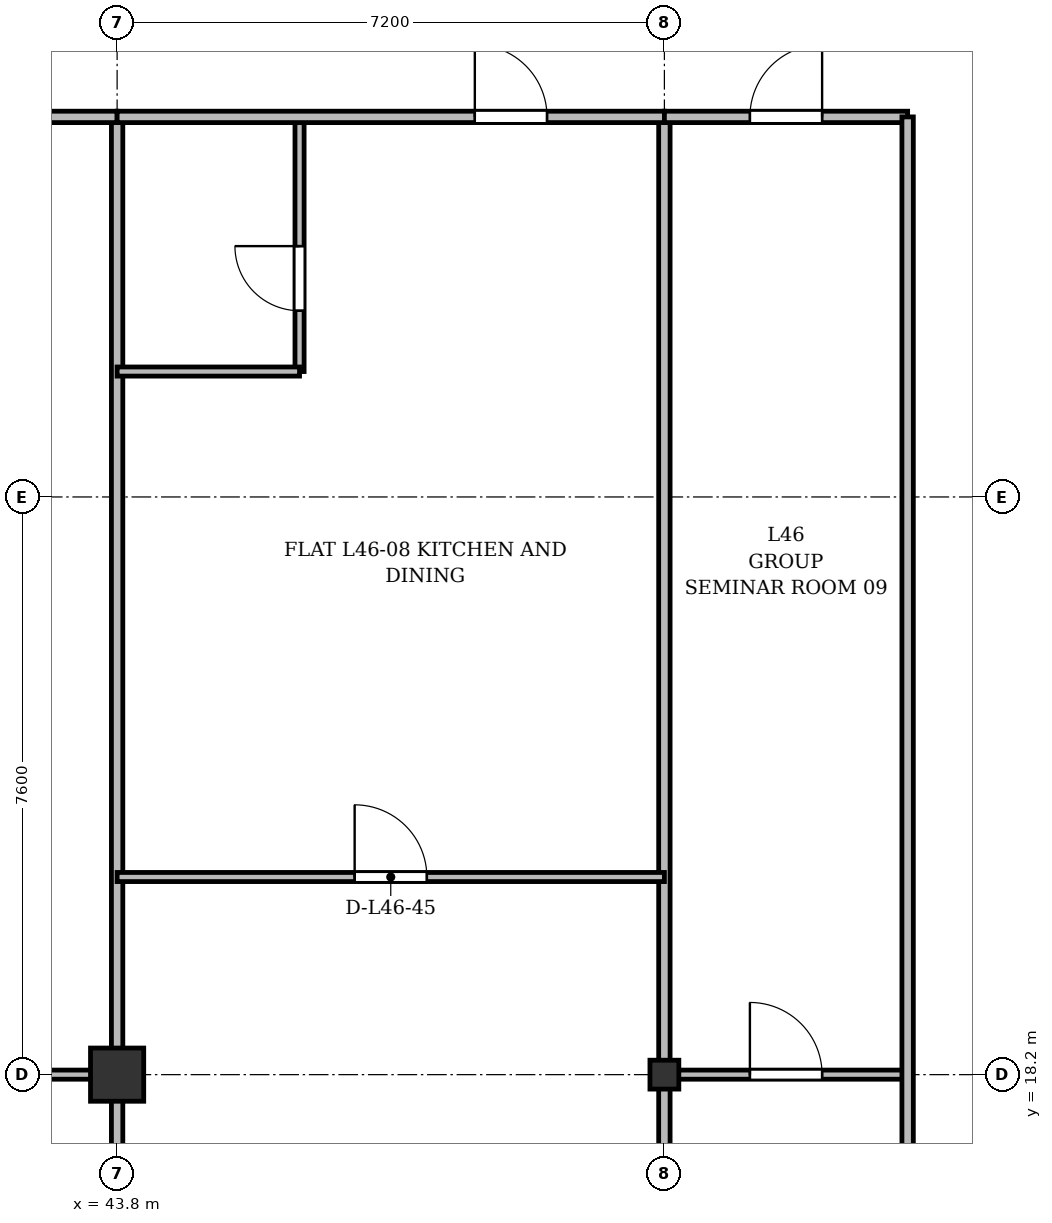
"""IFC4 building model, lengths in metres.
Left out: names, types, materials, properties, quantities, classifications, styles, units other than length and angle.
Written with IfcOpenShell. Run it as: python <this file> out.ifc"""

import sys

from ifc_helpers import new_model, si_unit, direction, frame, frame_2d, origin, origin_2d, place, context, subcontext, project, spatial, rectangle, i_section, extrude, source, transform, mapped, element, fill, save


model = new_model("IFC4")
c1 = context("Model", 3, precision=1e-05, world=origin(), true_north=direction((0.0, 1.0)))
c2 = subcontext(c1, "Body", "Model", "MODEL_VIEW")
j1 = project(units=[si_unit("LENGTHUNIT", "METRE"), si_unit("PLANEANGLEUNIT", "RADIAN")], contexts=[c1])
p1 = place(None, origin())
s1 = spatial("IfcSite", under=j1, at=p1, CompositionType="ELEMENT")
p2 = place(p1, origin())
s2 = spatial("IfcBuilding", under=s1, at=p2, CompositionType="ELEMENT")
p3 = place(p2, frame((0.0, 0.0, 175.3)))
s3 = spatial("IfcBuildingStorey", under=s2, at=p3, CompositionType="ELEMENT", Elevation=175.3)
m1 = source(origin(), c2, "Body", "SweptSolid", [
    extrude(rectangle(XDim=0.7, YDim=0.7, at=origin_2d()), origin(), (0.0, 0.0, 1.0), 3.6),
])
p4 = place(p3, frame((43.8, 18.2, 0.0), z_axis=(0.0, 0.0, 1.0), x_axis=(1.0, 0.0, 0.0)))
e1 = element("IfcColumn", 1, at=p4, inside=s3, PredefinedType="COLUMN", context=c2, shape_type="MappedRepresentation", body=[
    mapped(m1, transform((0.0, 0.0, 0.0), x_axis=(1.0, 0.0, 0.0), y_axis=(0.0, 1.0, 0.0), z_axis=(0.0, 0.0, 1.0), scale=1.0)),
])
m2 = source(origin(), c2, "Body", "SweptSolid", [
    extrude(i_section(OverallWidth=0.38, OverallDepth=0.38, WebThickness=0.02, FlangeThickness=0.03, at=origin_2d()), origin(), (0.0, 0.0, 1.0), 3.6),
])
p5 = place(p3, frame((51.0, 18.2, 0.0), z_axis=(0.0, 0.0, 1.0), x_axis=(1.0, 0.0, 0.0)))
e2 = element("IfcColumn", 2, at=p5, inside=s3, PredefinedType="COLUMN", context=c2, shape_type="MappedRepresentation", body=[
    mapped(m2, transform((0.0, 0.0, 0.0), x_axis=(1.0, 0.0, 0.0), y_axis=(0.0, 1.0, 0.0), z_axis=(0.0, 0.0, 1.0), scale=1.0)),
])
for number, where, z_axis, x_axis in (
    (3, (43.8, 3.525, 0.0), (0.0, 0.0, 1.0), (0.0, 1.0, 0.0)),
    (4, (51.0, 3.525, 0.0), (0.0, 0.0, 1.0), (0.0, 1.0, 0.0)),
):
    element("IfcWall", number, at=place(p3, frame(where, z_axis=z_axis, x_axis=x_axis)), inside=s3, PredefinedType="PARTITIONING", context=c2, shape_type="SweptSolid", body=[
        extrude(rectangle(XDim=27.275, YDim=0.15, at=frame_2d((13.638, 0.0))), origin(), (0.0, 0.0, 1.0), 2.85),
    ])
p6 = place(p3, frame((38.2, 30.8, 0.0), z_axis=(0.0, 0.0, 1.0), x_axis=(1.0, 0.0, 0.0)))
e5 = element("IfcWall", 5, at=p6, inside=s3, PredefinedType="PARTITIONING", context=c2, shape_type="SweptSolid", body=[
    extrude(rectangle(XDim=5.6, YDim=0.15, at=frame_2d((2.8, 0.0))), origin(), (0.0, 0.0, 1.0), 2.85),
])
p7 = place(p6, frame((2.232, 0.0, 0.0)))
e6 = element("IfcOpeningElement", 6, at=p7, cuts=e5, PredefinedType="OPENING", context=c2, shape_type="SweptSolid", body=[
    extrude(rectangle(XDim=0.95, YDim=2.15, at=frame_2d((0.475, 1.075))), frame((0.0, 0.085, 0.0), z_axis=(0.0, -1.0, 0.0), x_axis=(1.0, 0.0, 0.0)), (0.0, 0.0, 1.0), 0.17),
])
p8 = place(p3, frame((38.2, 18.2, 0.0), z_axis=(0.0, 0.0, 1.0), x_axis=(1.0, 0.0, 0.0)))
e7 = element("IfcWall", 7, at=p8, inside=s3, PredefinedType="PARTITIONING", context=c2, shape_type="SweptSolid", body=[
    extrude(rectangle(XDim=5.6, YDim=0.12, at=frame_2d((2.8, 0.0))), origin(), (0.0, 0.0, 1.0), 2.75),
])
p9 = place(p8, frame((2.232, 0.0, 0.0)))
e8 = element("IfcOpeningElement", 8, at=p9, cuts=e7, PredefinedType="OPENING", context=c2, shape_type="SweptSolid", body=[
    extrude(rectangle(XDim=0.95, YDim=2.15, at=frame_2d((0.475, 1.075))), frame((0.0, 0.07, 0.0), z_axis=(0.0, -1.0, 0.0), x_axis=(1.0, 0.0, 0.0)), (0.0, 0.0, 1.0), 0.14),
])
p10 = place(p3, frame((43.8, 20.8, 0.0), z_axis=(0.0, 0.0, 1.0), x_axis=(1.0, 0.0, 0.0)))
e9 = element("IfcWall", 9, at=p10, inside=s3, PredefinedType="PARTITIONING", context=c2, shape_type="SweptSolid", body=[
    extrude(rectangle(XDim=7.2, YDim=0.12, at=frame_2d((3.6, 0.0))), origin(), (0.0, 0.0, 1.0), 2.85),
])
p11 = place(p10, frame((3.125, 0.0, 0.0)))
e10 = element("IfcOpeningElement", 10, at=p11, cuts=e9, PredefinedType="OPENING", context=c2, shape_type="SweptSolid", body=[
    extrude(rectangle(XDim=0.95, YDim=2.15, at=frame_2d((0.475, 1.075))), frame((0.0, 0.07, 0.0), z_axis=(0.0, -1.0, 0.0), x_axis=(1.0, 0.0, 0.0)), (0.0, 0.0, 1.0), 0.14),
])
p12 = place(p3, frame((46.2, 27.45, 0.0), z_axis=(0.0, 0.0, 1.0), x_axis=(0.0, 1.0, 0.0)))
e11 = element("IfcWall", 11, at=p12, inside=s3, PredefinedType="PARTITIONING", context=c2, shape_type="SweptSolid", body=[
    extrude(rectangle(XDim=3.35, YDim=0.12, at=frame_2d((1.675, 0.0))), origin(), (0.0, 0.0, 1.0), 3.35),
])
p13 = place(p12, frame((0.8, 0.0, 0.0)))
e12 = element("IfcOpeningElement", 12, at=p13, cuts=e11, PredefinedType="OPENING", context=c2, shape_type="SweptSolid", body=[
    extrude(rectangle(XDim=0.85, YDim=2.1, at=frame_2d((0.425, 1.05))), frame((0.0, 0.07, 0.0), z_axis=(0.0, -1.0, 0.0), x_axis=(1.0, 0.0, 0.0)), (0.0, 0.0, 1.0), 0.14),
])
p14 = place(p3, frame((43.8, 27.45, 0.0), z_axis=(0.0, 0.0, 1.0), x_axis=(1.0, 0.0, 0.0)))
e13 = element("IfcWall", 13, at=p14, inside=s3, PredefinedType="PARTITIONING", context=c2, shape_type="SweptSolid", body=[
    extrude(rectangle(XDim=2.4, YDim=0.12, at=frame_2d((1.2, 0.0))), origin(), (0.0, 0.0, 1.0), 2.85),
])
p15 = place(p3, frame((43.8, 30.8, 0.0), z_axis=(0.0, 0.0, 1.0), x_axis=(1.0, 0.0, 0.0)))
e14 = element("IfcWall", 14, at=p15, inside=s3, PredefinedType="PARTITIONING", context=c2, shape_type="SweptSolid", body=[
    extrude(rectangle(XDim=7.2, YDim=0.15, at=frame_2d((3.6, 0.0))), origin(), (0.0, 0.0, 1.0), 2.85),
])
p16 = place(p15, frame((4.706, 0.0, 0.0)))
e15 = element("IfcOpeningElement", 15, at=p16, cuts=e14, PredefinedType="OPENING", context=c2, shape_type="SweptSolid", body=[
    extrude(rectangle(XDim=0.95, YDim=2.15, at=frame_2d((0.475, 1.075))), frame((0.0, 0.085, 0.0), z_axis=(0.0, -1.0, 0.0), x_axis=(1.0, 0.0, 0.0)), (0.0, 0.0, 1.0), 0.17),
])
p17 = place(p3, frame((51.0, 30.8, 0.0), z_axis=(0.0, 0.0, 1.0), x_axis=(1.0, 0.0, 0.0)))
e16 = element("IfcWall", 16, at=p17, inside=s3, PredefinedType="PARTITIONING", context=c2, shape_type="SweptSolid", body=[
    extrude(rectangle(XDim=3.2, YDim=0.15, at=frame_2d((1.6, 0.0))), origin(), (0.0, 0.0, 1.0), 2.85),
])
p18 = place(p17, frame((1.125, 0.0, 0.0)))
e17 = element("IfcOpeningElement", 17, at=p18, cuts=e16, PredefinedType="OPENING", context=c2, shape_type="SweptSolid", body=[
    extrude(rectangle(XDim=0.95, YDim=2.15, at=frame_2d((0.475, 1.075))), frame((0.0, 0.085, 0.0), z_axis=(0.0, -1.0, 0.0), x_axis=(1.0, 0.0, 0.0)), (0.0, 0.0, 1.0), 0.17),
])
p19 = place(p3, frame((51.0, 18.2, 0.0), z_axis=(0.0, 0.0, 1.0), x_axis=(1.0, 0.0, 0.0)))
e18 = element("IfcWall", 18, at=p19, inside=s3, PredefinedType="PARTITIONING", context=c2, shape_type="SweptSolid", body=[
    extrude(rectangle(XDim=3.2, YDim=0.12, at=frame_2d((1.6, 0.0))), origin(), (0.0, 0.0, 1.0), 2.75),
])
p20 = place(p19, frame((1.125, 0.0, 0.0)))
e19 = element("IfcOpeningElement", 19, at=p20, cuts=e18, PredefinedType="OPENING", context=c2, shape_type="SweptSolid", body=[
    extrude(rectangle(XDim=0.95, YDim=2.15, at=frame_2d((0.475, 1.075))), frame((0.0, 0.07, 0.0), z_axis=(0.0, -1.0, 0.0), x_axis=(1.0, 0.0, 0.0)), (0.0, 0.0, 1.0), 0.14),
])
p21 = place(p3, frame((54.2, 3.525, 0.0), z_axis=(0.0, 0.0, 1.0), x_axis=(0.0, 1.0, 0.0)))
e20 = element("IfcWall", 20, at=p21, inside=s3, PredefinedType="PARTITIONING", context=c2, shape_type="SweptSolid", body=[
    extrude(rectangle(XDim=27.275, YDim=0.15, at=frame_2d((13.638, 0.0))), origin(), (0.0, 0.0, 1.0), 2.75),
])
m3 = source(origin(), c2, "Body", "SweptSolid", [
    extrude(rectangle(XDim=0.95, YDim=2.15, at=frame_2d((0.475, 1.075))), frame((0.0, 0.025, 0.0), z_axis=(0.0, -1.0, 0.0), x_axis=(1.0, 0.0, 0.0)), (0.0, 0.0, 1.0), 0.05),
])
p22 = place(p11, origin())
e21 = element("IfcDoor", 21, at=p22, inside=s3, OperationType="SINGLE_SWING_LEFT", PredefinedType="DOOR", context=c2, shape_type="MappedRepresentation", body=[
    mapped(m3, transform((0.0, 0.0, 0.0), x_axis=(1.0, 0.0, 0.0), y_axis=(0.0, 1.0, 0.0), z_axis=(0.0, 0.0, 1.0), scale=1.0)),
])
fill(e10, e21)
m4 = source(origin(), c2, "Body", "SweptSolid", [
    extrude(rectangle(XDim=0.85, YDim=2.1, at=frame_2d((0.425, 1.05))), frame((0.0, 0.025, 0.0), z_axis=(0.0, -1.0, 0.0), x_axis=(1.0, 0.0, 0.0)), (0.0, 0.0, 1.0), 0.05),
])
p23 = place(p13, origin())
e22 = element("IfcDoor", 22, at=p23, inside=s3, OperationType="SINGLE_SWING_RIGHT", PredefinedType="DOOR", context=c2, shape_type="MappedRepresentation", body=[
    mapped(m4, transform((0.0, 0.0, 0.0), x_axis=(1.0, 0.0, 0.0), y_axis=(0.0, 1.0, 0.0), z_axis=(0.0, 0.0, 1.0), scale=1.0)),
])
fill(e12, e22)
p24 = place(p16, origin())
e23 = element("IfcDoor", 23, at=p24, inside=s3, OperationType="SINGLE_SWING_LEFT", PredefinedType="DOOR", context=c2, shape_type="MappedRepresentation", body=[
    mapped(m3, transform((0.0, 0.0, 0.0), x_axis=(1.0, 0.0, 0.0), y_axis=(0.0, 1.0, 0.0), z_axis=(0.0, 0.0, 1.0), scale=1.0)),
])
fill(e15, e23)
p25 = place(p18, origin())
e24 = element("IfcDoor", 24, at=p25, inside=s3, OperationType="SINGLE_SWING_RIGHT", PredefinedType="DOOR", context=c2, shape_type="MappedRepresentation", body=[
    mapped(m3, transform((0.0, 0.0, 0.0), x_axis=(1.0, 0.0, 0.0), y_axis=(0.0, 1.0, 0.0), z_axis=(0.0, 0.0, 1.0), scale=1.0)),
])
fill(e17, e24)
p26 = place(p20, origin())
e25 = element("IfcDoor", 25, at=p26, inside=s3, OperationType="SINGLE_SWING_LEFT", PredefinedType="DOOR", context=c2, shape_type="MappedRepresentation", body=[
    mapped(m3, transform((0.0, 0.0, 0.0), x_axis=(1.0, 0.0, 0.0), y_axis=(0.0, 1.0, 0.0), z_axis=(0.0, 0.0, 1.0), scale=1.0)),
])
fill(e19, e25)
save(model, sys.argv[1])
